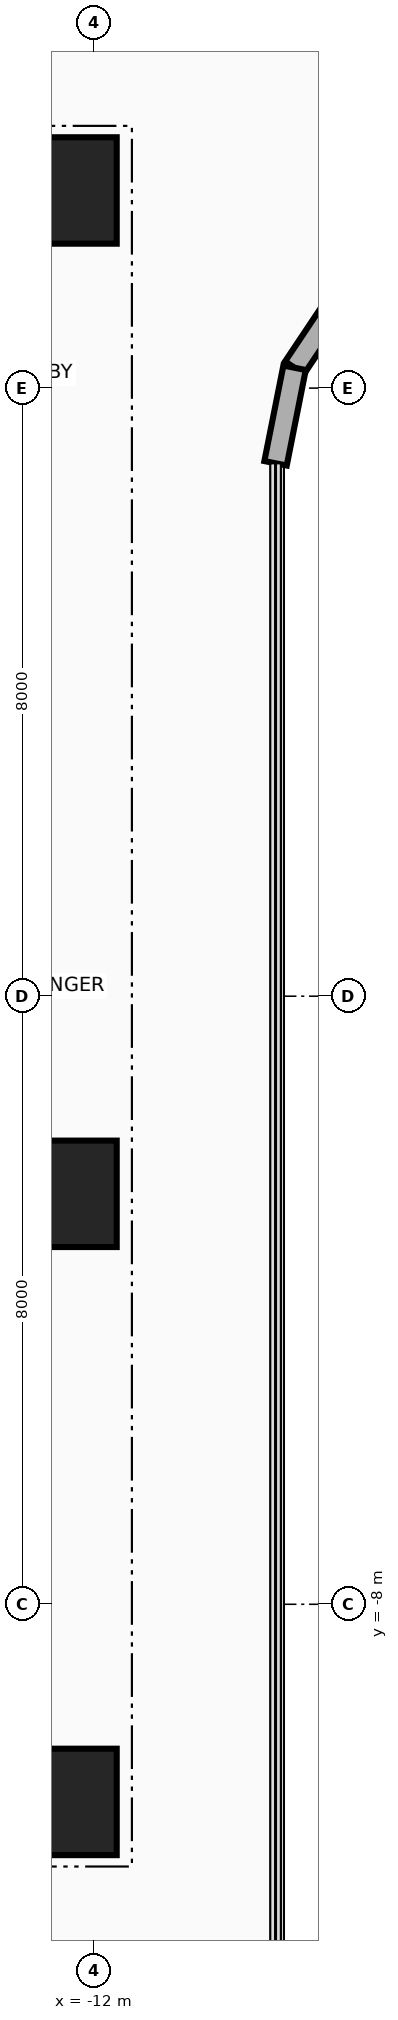
"""IFC4 building model, lengths in metres.
Left out: names, types, materials, properties, quantities, classifications, styles, units other than length and angle.
Written with IfcOpenShell. Run it as: python <this file> out.ifc"""

import sys

from ifc_helpers import new_model, si_unit, direction, frame, frame_2d, origin, origin_2d, place, context, subcontext, project, spatial, rectangle, extrude, source, transform, mapped, element, save


model = new_model("IFC4")
c1 = context("Model", 3, precision=1e-05, world=origin(), true_north=direction((0.0, 1.0)))
c2 = subcontext(c1, "Body", "Model", "MODEL_VIEW")
j1 = project(units=[si_unit("LENGTHUNIT", "METRE"), si_unit("PLANEANGLEUNIT", "RADIAN")], contexts=[c1])
p1 = place(None, origin())
s1 = spatial("IfcSite", under=j1, at=p1, CompositionType="ELEMENT")
p2 = place(p1, origin())
s2 = spatial("IfcBuilding", under=s1, at=p2, CompositionType="ELEMENT")
p3 = place(p2, frame((0.0, 0.0, 77.8)))
s3 = spatial("IfcBuildingStorey", under=s2, at=p3, CompositionType="ELEMENT", Elevation=77.8)
for number, where, z_axis, x_axis in (
    (1, (-22.65, 10.8, 0.0), (0.0, 0.0, 1.0), (1.0, 0.0, 0.0)),
    (2, (-22.65, -10.8, 0.0), (0.0, 0.0, 1.0), (1.0, 0.0, 0.0)),
):
    element("IfcWall", number, at=place(p3, frame(where, z_axis=z_axis, x_axis=x_axis)), inside=s3, PredefinedType="SHEAR", context=c2, shape_type="SweptSolid", body=[
        extrude(rectangle(XDim=10.25, YDim=0.7, at=frame_2d((5.125, 0.0))), origin(), (0.0, 0.0, 1.0), 3.46),
    ])
m1 = source(origin(), c2, "Body", "SweptSolid", [
    extrude(rectangle(XDim=1.4, YDim=1.4, at=origin_2d()), origin(), (0.0, 0.0, 1.0), 3.7),
])
for number, where, z_axis, x_axis in (
    (3, (-12.4, -10.6, 0.0), (0.0, 0.0, 1.0), (1.0, 0.0, 0.0)),
    (4, (-12.4, -2.6, 0.0), (0.0, 0.0, 1.0), (1.0, 0.0, 0.0)),
    (5, (-12.4, 10.6, 0.0), (0.0, 0.0, 1.0), (1.0, 0.0, 0.0)),
):
    element("IfcColumn", number, at=place(p3, frame(where, z_axis=z_axis, x_axis=x_axis)), inside=s3, PredefinedType="COLUMN", context=c2, shape_type="MappedRepresentation", body=[
        mapped(m1, transform((0.0, 0.0, 0.0), x_axis=(1.0, 0.0, 0.0), y_axis=(0.0, 1.0, 0.0), z_axis=(0.0, 0.0, 1.0), scale=1.0)),
    ])
p4 = place(p3, frame((-8.642, 9.342, 0.0), z_axis=(0.0, 0.0, 1.0), x_axis=(-0.555615398575, -0.831439431869, 0.0)))
e6 = element("IfcWall", 6, at=p4, inside=s3, PredefinedType="SOLIDWALL", context=c2, shape_type="SweptSolid", body=[
    extrude(rectangle(XDim=1.292, YDim=0.3, at=frame_2d((0.646, 0.0))), origin(), (0.0, 0.0, 1.0), 3.46),
])
p5 = place(p3, frame((-9.36, 8.268, 0.0), z_axis=(0.0, 0.0, 1.0), x_axis=(-0.195090163074, -0.980785312019, 0.0)))
e7 = element("IfcWall", 7, at=p5, inside=s3, PredefinedType="SOLIDWALL", context=c2, shape_type="SweptSolid", body=[
    extrude(rectangle(XDim=1.281, YDim=0.3, at=frame_2d((0.641, 0.0))), origin(), (0.0, 0.0, 1.0), 3.46),
])
save(model, sys.argv[1])
